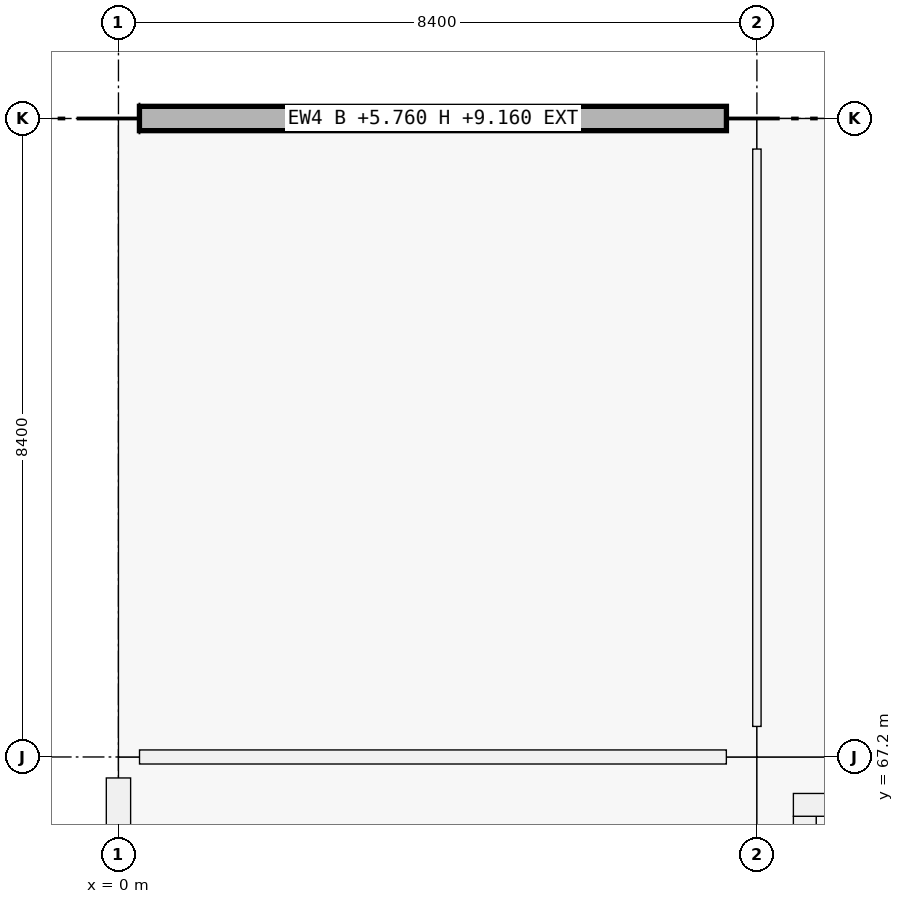
"""IFC4 building model, lengths in metres.
Left out: names, types, materials, properties, quantities, classifications, styles, units other than length and angle.
Written with IfcOpenShell. Run it as: python <this file> out.ifc"""

import sys

from ifc_helpers import new_model, si_unit, direction, frame, frame_2d, origin, origin_2d, place, context, subcontext, project, spatial, rectangle, extrude, element, fill, save


model = new_model("IFC4")
c1 = context("Model", 3, precision=1e-05, world=origin(), true_north=direction((0.0, 1.0)))
c2 = subcontext(c1, "Body", "Model", "MODEL_VIEW")
j1 = project(units=[si_unit("LENGTHUNIT", "METRE"), si_unit("PLANEANGLEUNIT", "RADIAN")], contexts=[c1])
p1 = place(None, origin())
s1 = spatial("IfcSite", under=j1, at=p1, CompositionType="ELEMENT")
p2 = place(p1, origin())
s2 = spatial("IfcBuilding", under=s1, at=p2, CompositionType="ELEMENT")
p3 = place(p2, frame((0.0, 0.0, 5.76)))
s3 = spatial("IfcBuildingStorey", under=s2, at=p3, CompositionType="ELEMENT", Elevation=5.76)
for number, where, z_axis, x_axis in (
    (1, (0.0, 67.2, 0.0), (0.0, 0.0, 1.0), (1.0, 0.0, 0.0)),
    (2, (0.0, 75.6, 0.0), (0.0, 0.0, 1.0), (1.0, 0.0, 0.0)),
):
    element("IfcColumn", number, at=place(p3, frame(where, z_axis=z_axis, x_axis=x_axis)), inside=s3, PredefinedType="COLUMN", context=c2, shape_type="SweptSolid", body=[
        extrude(rectangle(XDim=0.55, YDim=0.55, at=origin_2d()), origin(), (0.0, 0.0, 1.0), 4.2),
    ])
for number, where, z_axis, x_axis in (
    (3, (8.4, 67.2, 0.0), (0.0, 0.0, 1.0), (1.0, 0.0, 0.0)),
    (4, (8.4, 75.6, 0.0), (0.0, 0.0, 1.0), (1.0, 0.0, 0.0)),
):
    element("IfcColumn", number, at=place(p3, frame(where, z_axis=z_axis, x_axis=x_axis)), inside=s3, PredefinedType="COLUMN", context=c2, shape_type="SweptSolid", body=[
        extrude(rectangle(XDim=0.8, YDim=0.8, at=origin_2d()), origin(), (0.0, 0.0, 1.0), 4.5),
    ])
p4 = place(p3, frame((0.0, 59.076, 0.0), z_axis=(0.0, 0.0, 1.0), x_axis=(0.0, 1.0, 0.0)))
e5 = element("IfcWall", 5, at=p4, inside=s3, PredefinedType="SOLIDWALL", context=c2, shape_type="SweptSolid", body=[
    extrude(rectangle(XDim=7.848, YDim=0.32, at=frame_2d((3.924, 0.0))), origin(), (0.0, 0.0, 1.0), 3.4),
])
p5 = place(p4, frame((2.724, 0.0, 0.9)))
e6 = element("IfcOpeningElement", 6, at=p5, cuts=e5, PredefinedType="OPENING", context=c2, shape_type="SweptSolid", body=[
    extrude(rectangle(XDim=2.4, YDim=2.25, at=frame_2d((1.2, 1.125))), frame((0.0, 0.16, 0.0), z_axis=(0.0, -1.0, 0.0), x_axis=(1.0, 0.0, 0.0)), (0.0, 0.0, 1.0), 0.32),
])
p6 = place(p3, frame((0.276, 75.6, 0.0), z_axis=(0.0, 0.0, 1.0), x_axis=(1.0, 0.0, 0.0)))
e7 = element("IfcWall", 7, at=p6, inside=s3, PredefinedType="SOLIDWALL", context=c2, shape_type="SweptSolid", body=[
    extrude(rectangle(XDim=7.723, YDim=0.32, at=frame_2d((3.862, 0.0))), origin(), (0.0, 0.0, 1.0), 3.4),
])
p7 = place(p6, frame((2.861, 0.0, 0.9)))
e8 = element("IfcOpeningElement", 8, at=p7, cuts=e7, PredefinedType="OPENING", context=c2, shape_type="SweptSolid", body=[
    extrude(rectangle(XDim=2.0, YDim=2.25, at=frame_2d((1.0, 1.125))), frame((0.0, 0.16, 0.0), z_axis=(0.0, -1.0, 0.0), x_axis=(1.0, 0.0, 0.0)), (0.0, 0.0, 1.0), 0.32),
])
p8 = place(p3, frame((9.03, 59.58, 0.0), z_axis=(0.0, 0.0, 1.0), x_axis=(0.0, 1.0, 0.0)))
e9 = element("IfcWall", 9, at=p8, inside=s3, PredefinedType="SHEAR", context=c2, shape_type="SweptSolid", body=[
    extrude(rectangle(XDim=6.84, YDim=0.3, at=frame_2d((3.42, 0.0))), origin(), (0.0, 0.0, 1.0), 4.5),
])
p9 = place(p3, frame((8.88, 66.57, 0.0), z_axis=(0.0, 0.0, 1.0), x_axis=(1.0, 0.0, 0.0)))
e10 = element("IfcWall", 10, at=p9, inside=s3, PredefinedType="SHEAR", context=c2, shape_type="SweptSolid", body=[
    extrude(rectangle(XDim=7.44, YDim=0.3, at=frame_2d((3.72, 0.0))), origin(), (0.0, 0.0, 1.0), 4.5),
])
p10 = place(p3, frame((0.277, 67.2, 0.0), z_axis=(0.0, 0.0, 1.0), x_axis=(1.0, 0.0, 0.0)))
e11 = element("IfcWall", 11, at=p10, inside=s3, PredefinedType="PARTITIONING", context=c2, shape_type="SweptSolid", body=[
    extrude(rectangle(XDim=7.721, YDim=0.185, at=frame_2d((3.86, 0.0))), origin(), (0.0, 0.0, 1.0), 2.4),
])
p11 = place(p10, frame((3.37, 0.0, 0.0)))
e12 = element("IfcOpeningElement", 12, at=p11, cuts=e11, PredefinedType="OPENING", context=c2, shape_type="SweptSolid", body=[
    extrude(rectangle(XDim=0.98, YDim=2.18, at=frame_2d((0.49, 1.09))), frame((0.0, 0.093, 0.0), z_axis=(0.0, -1.0, 0.0), x_axis=(1.0, 0.0, 0.0)), (0.0, 0.0, 1.0), 0.185),
])
p12 = place(p3, frame((8.4, 67.602, 0.0), z_axis=(0.0, 0.0, 1.0), x_axis=(0.0, 1.0, 0.0)))
e13 = element("IfcWall", 13, at=p12, inside=s3, PredefinedType="MOVABLE", context=c2, shape_type="SweptSolid", body=[
    extrude(rectangle(XDim=7.596, YDim=0.11, at=frame_2d((3.798, 0.0))), origin(), (0.0, 0.0, 1.0), 2.4),
])
p13 = place(p12, frame((3.318, 0.0, 0.0)))
e14 = element("IfcOpeningElement", 14, at=p13, cuts=e13, PredefinedType="OPENING", context=c2, shape_type="SweptSolid", body=[
    extrude(rectangle(XDim=0.96, YDim=2.18, at=frame_2d((0.48, 1.09))), frame((0.0, 0.055, 0.0), z_axis=(0.0, -1.0, 0.0), x_axis=(1.0, 0.0, 0.0)), (0.0, 0.0, 1.0), 0.11),
])
p14 = place(p7, origin())
e15 = element("IfcWindow", 15, at=p14, inside=s3, PartitioningType="SINGLE_PANEL", PredefinedType="WINDOW", context=c2, shape_type="SweptSolid", body=[
    extrude(rectangle(XDim=2.0, YDim=2.25, at=frame_2d((1.0, 1.125))), frame((0.0, 0.03, 0.0), z_axis=(0.0, -1.0, 0.0), x_axis=(1.0, 0.0, 0.0)), (0.0, 0.0, 1.0), 0.06),
])
fill(e8, e15)
p15 = place(p11, origin())
e16 = element("IfcDoor", 16, at=p15, inside=s3, OperationType="SINGLE_SWING_RIGHT", PredefinedType="DOOR", context=c2, shape_type="SweptSolid", body=[
    extrude(rectangle(XDim=0.98, YDim=2.18, at=frame_2d((0.49, 1.09))), frame((0.0, 0.025, 0.0), z_axis=(0.0, -1.0, 0.0), x_axis=(1.0, 0.0, 0.0)), (0.0, 0.0, 1.0), 0.05),
])
fill(e12, e16)
p16 = place(p13, origin())
e17 = element("IfcDoor", 17, at=p16, inside=s3, OperationType="SINGLE_SWING_LEFT", PredefinedType="DOOR", context=c2, shape_type="SweptSolid", body=[
    extrude(rectangle(XDim=0.96, YDim=2.18, at=frame_2d((0.48, 1.09))), frame((0.0, 0.025, 0.0), z_axis=(0.0, -1.0, 0.0), x_axis=(1.0, 0.0, 0.0)), (0.0, 0.0, 1.0), 0.05),
])
fill(e14, e17)
save(model, sys.argv[1])
